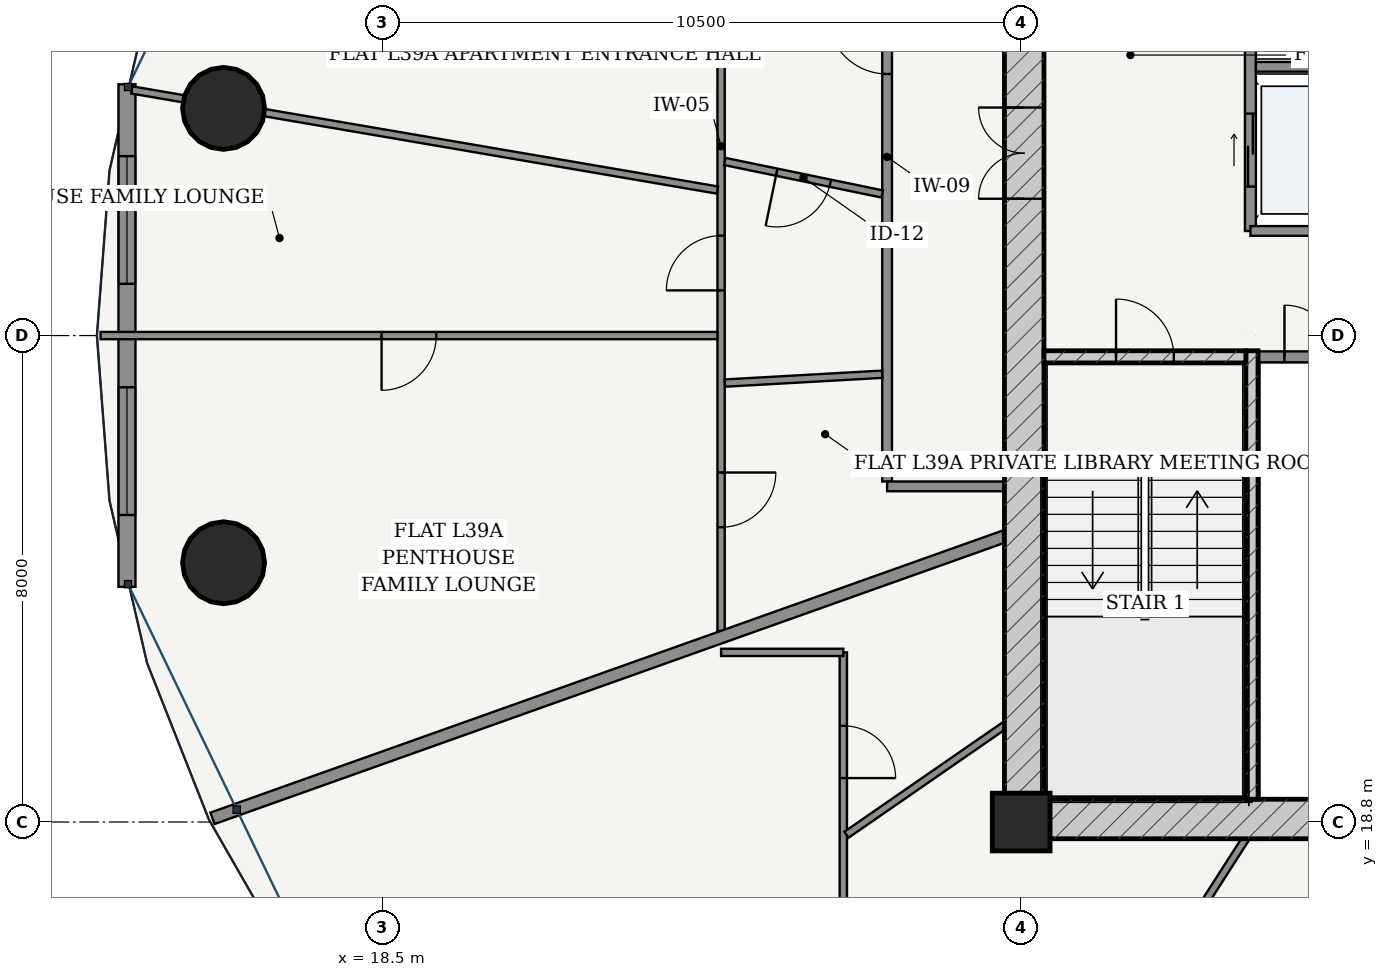
"""IFC4 building model, lengths in metres.
Left out: names, types, materials, properties, quantities, classifications, styles, units other than length and angle.
Written with IfcOpenShell. Run it as: python <this file> out.ifc"""

import sys

from ifc_helpers import new_model, si_unit, direction, frame, frame_2d, origin, origin_2d, place, context, subcontext, project, spatial, rectangle, hollow_circle, extrude, source, transform, mapped, element, fill, save


model = new_model("IFC4")
c1 = context("Model", 3, precision=1e-05, world=origin(), true_north=direction((-0.2419218956, 0.970295726276)))
c2 = subcontext(c1, "Body", "Model", "MODEL_VIEW")
j1 = project(units=[si_unit("LENGTHUNIT", "METRE"), si_unit("PLANEANGLEUNIT", "RADIAN")], contexts=[c1])
p1 = place(None, origin())
s1 = spatial("IfcSite", under=j1, at=p1, CompositionType="ELEMENT")
p2 = place(p1, origin())
s2 = spatial("IfcBuilding", under=s1, at=p2, CompositionType="ELEMENT")
p3 = place(p2, frame((0.0, 0.0, 149.8)))
s3 = spatial("IfcBuildingStorey", under=s2, at=p3, CompositionType="ELEMENT", Elevation=149.8)
p4 = place(p3, frame((29.0, 18.8, 0.0), z_axis=(0.0, 0.0, 1.0), x_axis=(1.0, 0.0, 0.0)))
e1 = element("IfcColumn", 1, at=p4, inside=s3, PredefinedType="COLUMN", context=c2, shape_type="SweptSolid", body=[
    extrude(rectangle(XDim=0.95, YDim=0.95, at=origin_2d()), origin(), (0.0, 0.0, 1.0), 3.6),
])
p5 = place(p3, frame((28.725, 18.85, 0.0), z_axis=(0.0, 0.0, 1.0), x_axis=(1.0, 0.0, 0.0)))
e2 = element("IfcWall", 2, at=p5, inside=s3, PredefinedType="SHEAR", context=c2, shape_type="SweptSolid", body=[
    extrude(rectangle(XDim=18.55, YDim=0.65, at=frame_2d((9.275, 0.0))), origin(), (0.0, 0.0, 1.0), 3.33),
])
p6 = place(p5, frame((7.51, 0.0, 0.0)))
e3 = element("IfcOpeningElement", 3, at=p6, cuts=e2, PredefinedType="OPENING", context=c2, shape_type="SweptSolid", body=[
    extrude(rectangle(XDim=0.85, YDim=2.1, at=frame_2d((0.425, 1.05))), frame((0.0, 0.335, 0.0), z_axis=(0.0, -1.0, 0.0), x_axis=(1.0, 0.0, 0.0)), (0.0, 0.0, 1.0), 0.67),
])
p7 = place(p5, frame((10.59, 0.0, 0.0)))
e4 = element("IfcOpeningElement", 4, at=p7, cuts=e2, PredefinedType="OPENING", context=c2, shape_type="SweptSolid", body=[
    extrude(rectangle(XDim=0.85, YDim=2.1, at=frame_2d((0.425, 1.05))), frame((0.0, 0.335, 0.0), z_axis=(0.0, -1.0, 0.0), x_axis=(1.0, 0.0, 0.0)), (0.0, 0.0, 1.0), 0.67),
])
p8 = place(p3, frame((29.05, 19.175, 0.0), z_axis=(0.0, 0.0, 1.0), x_axis=(0.0, 1.0, 0.0)))
e5 = element("IfcWall", 5, at=p8, inside=s3, PredefinedType="SHEAR", context=c2, shape_type="SweptSolid", body=[
    extrude(rectangle(XDim=15.25, YDim=0.65, at=frame_2d((7.625, 0.0))), origin(), (0.0, 0.0, 1.0), 3.33),
])
p9 = place(p8, frame((9.875, 0.0, 0.0)))
e6 = element("IfcOpeningElement", 6, at=p9, cuts=e5, PredefinedType="OPENING", context=c2, shape_type="SweptSolid", body=[
    extrude(rectangle(XDim=1.5, YDim=2.2, at=frame_2d((0.75, 1.1))), frame((0.0, 0.335, 0.0), z_axis=(0.0, -1.0, 0.0), x_axis=(1.0, 0.0, 0.0)), (0.0, 0.0, 1.0), 0.67),
])
p10 = place(p3, frame((32.795, 19.175, 0.0), z_axis=(0.0, 0.0, 1.0), x_axis=(0.0, 1.0, 0.0)))
e7 = element("IfcWall", 7, at=p10, inside=s3, PredefinedType="SOLIDWALL", context=c2, shape_type="SweptSolid", body=[
    extrude(rectangle(XDim=7.375, YDim=0.2, at=frame_2d((3.688, 0.0))), origin(), (0.0, 0.0, 1.0), 3.33),
])
p11 = place(p3, frame((29.375, 26.45, 0.0), z_axis=(0.0, 0.0, 1.0), x_axis=(1.0, 0.0, 0.0)))
e8 = element("IfcWall", 8, at=p11, inside=s3, PredefinedType="SOLIDWALL", context=c2, shape_type="SweptSolid", body=[
    extrude(rectangle(XDim=3.32, YDim=0.2, at=frame_2d((1.66, 0.0))), origin(), (0.0, 0.0, 1.0), 3.33),
])
p12 = place(p11, frame((1.185, 0.0, 0.0)))
e9 = element("IfcOpeningElement", 9, at=p12, cuts=e8, PredefinedType="OPENING", context=c2, shape_type="SweptSolid", body=[
    extrude(rectangle(XDim=0.95, YDim=2.15, at=frame_2d((0.475, 1.075))), frame((0.0, 0.11, 0.0), z_axis=(0.0, -1.0, 0.0), x_axis=(1.0, 0.0, 0.0)), (0.0, 0.0, 1.0), 0.22),
])
for number, where, z_axis, x_axis in (
    (10, (15.883, 30.536, 0.0), (0.0, 0.0, 1.0), (1.0, 0.0, 0.0)),
    (11, (15.883, 23.064, 0.0), (0.0, 0.0, 1.0), (1.0, 0.0, 0.0)),
):
    element("IfcColumn", number, at=place(p3, frame(where, z_axis=z_axis, x_axis=x_axis)), inside=s3, PredefinedType="COLUMN", context=c2, shape_type="SweptSolid", body=[
        extrude(hollow_circle(Radius=0.675, WallThickness=0.042, at=origin_2d()), origin(), (0.0, 0.0, 1.0), 3.6),
    ])
p13 = place(p3, frame((14.294, 30.932, 0.0), z_axis=(0.0, 0.0, 1.0), x_axis=(0.0, -1.0, 0.0)))
e12 = element("IfcWall", 12, at=p13, inside=s3, PredefinedType="SOLIDWALL", context=c2, shape_type="SweptSolid", body=[
    extrude(rectangle(XDim=8.264, YDim=0.28, at=frame_2d((4.132, 0.0))), origin(), (0.0, 0.0, 1.0), 3.33),
])
p14 = place(p13, frame((1.181, 0.0, 0.85)))
e13 = element("IfcOpeningElement", 13, at=p14, cuts=e12, PredefinedType="OPENING", context=c2, shape_type="SweptSolid", body=[
    extrude(rectangle(XDim=2.1, YDim=1.95, at=frame_2d((1.05, 0.975))), frame((0.0, 0.15, 0.0), z_axis=(0.0, -1.0, 0.0), x_axis=(1.0, 0.0, 0.0)), (0.0, 0.0, 1.0), 0.3),
])
p15 = place(p13, frame((4.983, 0.0, 0.85)))
e14 = element("IfcOpeningElement", 14, at=p15, cuts=e12, PredefinedType="OPENING", context=c2, shape_type="SweptSolid", body=[
    extrude(rectangle(XDim=2.1, YDim=1.95, at=frame_2d((1.05, 0.975))), frame((0.0, 0.15, 0.0), z_axis=(0.0, -1.0, 0.0), x_axis=(1.0, 0.0, 0.0)), (0.0, 0.0, 1.0), 0.3),
])
p16 = place(p3, frame((32.9, 26.45, 0.0), z_axis=(0.0, 0.0, 1.0), x_axis=(1.0, 0.0, 0.0)))
e15 = element("IfcWall", 15, at=p16, inside=s3, PredefinedType="PARTITIONING", context=c2, shape_type="SweptSolid", body=[
    extrude(rectangle(XDim=1.71, YDim=0.18, at=frame_2d((0.855, 0.0))), origin(), (0.0, 0.0, 1.0), 3.33),
])
p17 = place(p16, frame((0.43, 0.0, 0.0)))
e16 = element("IfcOpeningElement", 16, at=p17, cuts=e15, PredefinedType="OPENING", context=c2, shape_type="SweptSolid", body=[
    extrude(rectangle(XDim=0.85, YDim=2.1, at=frame_2d((0.425, 1.05))), frame((0.0, 0.1, 0.0), z_axis=(0.0, -1.0, 0.0), x_axis=(1.0, 0.0, 0.0)), (0.0, 0.0, 1.0), 0.2),
])
p18 = place(p3, frame((32.77, 28.52, 0.0), z_axis=(0.0, 0.0, 1.0), x_axis=(0.0, 1.0, 0.0)))
e17 = element("IfcWall", 17, at=p18, inside=s3, PredefinedType="PARTITIONING", context=c2, shape_type="SweptSolid", body=[
    extrude(rectangle(XDim=5.905, YDim=0.18, at=frame_2d((2.953, 0.0))), origin(), (0.0, 0.0, 1.0), 3.33),
])
p19 = place(p18, frame((3.655, 0.0, 0.0)))
e18 = element("IfcOpeningElement", 18, at=p19, cuts=e17, PredefinedType="OPENING", context=c2, shape_type="SweptSolid", body=[
    extrude(rectangle(XDim=1.15, YDim=2.2, at=frame_2d((0.575, 1.1))), frame((0.0, 0.1, 0.0), z_axis=(0.0, -1.0, 0.0), x_axis=(1.0, 0.0, 0.0)), (0.0, 0.0, 1.0), 0.2),
])
p20 = place(p18, frame((0.73, 0.0, 0.0)))
e19 = element("IfcOpeningElement", 19, at=p20, cuts=e17, PredefinedType="OPENING", context=c2, shape_type="SweptSolid", body=[
    extrude(rectangle(XDim=1.2, YDim=2.25, at=frame_2d((0.6, 1.125))), frame((0.0, 0.1, 0.0), z_axis=(0.0, -1.0, 0.0), x_axis=(1.0, 0.0, 0.0)), (0.0, 0.0, 1.0), 0.2),
])
p21 = place(p3, frame((32.86, 31.22, 0.0), z_axis=(0.0, 0.0, 1.0), x_axis=(1.0, 0.0, 0.0)))
e20 = element("IfcWall", 20, at=p21, inside=s3, PredefinedType="PARTITIONING", context=c2, shape_type="SweptSolid", body=[
    extrude(rectangle(XDim=1.75, YDim=0.16, at=frame_2d((0.875, 0.0))), origin(), (0.0, 0.0, 1.0), 3.33),
])
p22 = place(p3, frame((32.77, 28.52, 0.0), z_axis=(0.0, 0.0, 1.0), x_axis=(1.0, 0.0, 0.0)))
e21 = element("IfcWall", 21, at=p22, inside=s3, PredefinedType="PARTITIONING", context=c2, shape_type="SweptSolid", body=[
    extrude(rectangle(XDim=1.84, YDim=0.16, at=frame_2d((0.92, 0.0))), origin(), (0.0, 0.0, 1.0), 3.33),
])
p23 = place(p3, frame((26.795, 24.4, 0.0), z_axis=(0.0, 0.0, 1.0), x_axis=(0.0, 1.0, 0.0)))
e22 = element("IfcWall", 22, at=p23, inside=s3, PredefinedType="PARTITIONING", context=c2, shape_type="SweptSolid", body=[
    extrude(rectangle(XDim=10.675, YDim=0.16, at=frame_2d((5.337, 0.0))), origin(), (0.0, 0.0, 1.0), 2.776),
])
p24 = place(p23, frame((6.702, 0.0, 0.0)))
e23 = element("IfcOpeningElement", 23, at=p24, cuts=e22, PredefinedType="OPENING", context=c2, shape_type="SweptSolid", body=[
    extrude(rectangle(XDim=0.98, YDim=2.2, at=frame_2d((0.49, 1.1))), frame((0.0, 0.09, 0.0), z_axis=(0.0, -1.0, 0.0), x_axis=(1.0, 0.0, 0.0)), (0.0, 0.0, 1.0), 0.18),
])
p25 = place(p3, frame((26.795, 24.32, 0.0), z_axis=(0.0, 0.0, 1.0), x_axis=(1.0, 0.0, 0.0)))
e24 = element("IfcWall", 24, at=p25, inside=s3, PredefinedType="PARTITIONING", context=c2, shape_type="SweptSolid", body=[
    extrude(rectangle(XDim=1.93, YDim=0.16, at=frame_2d((0.965, 0.0))), origin(), (0.0, 0.0, 1.0), 3.33),
])
p26 = place(p3, frame((24.065, 21.941, 0.0), z_axis=(0.0, 0.0, 1.0), x_axis=(0.0, 1.0, 0.0)))
e25 = element("IfcWall", 25, at=p26, inside=s3, PredefinedType="PARTITIONING", context=c2, shape_type="SweptSolid", body=[
    extrude(rectangle(XDim=15.944, YDim=0.12, at=frame_2d((7.972, 0.0))), origin(), (0.0, 0.0, 1.0), 2.776),
])
p27 = place(p26, frame((5.602, 0.0, 0.0)))
e26 = element("IfcOpeningElement", 26, at=p27, cuts=e25, PredefinedType="OPENING", context=c2, shape_type="SweptSolid", body=[
    extrude(rectangle(XDim=0.9, YDim=2.15, at=frame_2d((0.45, 1.075))), frame((0.0, 0.07, 0.0), z_axis=(0.0, -1.0, 0.0), x_axis=(1.0, 0.0, 0.0)), (0.0, 0.0, 1.0), 0.14),
])
p28 = place(p26, frame((1.707, 0.0, 0.0)))
e27 = element("IfcOpeningElement", 27, at=p28, cuts=e25, PredefinedType="OPENING", context=c2, shape_type="SweptSolid", body=[
    extrude(rectangle(XDim=0.9, YDim=2.15, at=frame_2d((0.45, 1.075))), frame((0.0, 0.07, 0.0), z_axis=(0.0, -1.0, 0.0), x_axis=(1.0, 0.0, 0.0)), (0.0, 0.0, 1.0), 0.14),
])
p29 = place(p26, frame((11.402, 0.0, 0.0)))
e28 = element("IfcOpeningElement", 28, at=p29, cuts=e25, PredefinedType="OPENING", context=c2, shape_type="SweptSolid", body=[
    extrude(rectangle(XDim=0.9, YDim=2.15, at=frame_2d((0.45, 1.075))), frame((0.0, 0.07, 0.0), z_axis=(0.0, -1.0, 0.0), x_axis=(1.0, 0.0, 0.0)), (0.0, 0.0, 1.0), 0.14),
])
p30 = place(p3, frame((24.004, 29.193, 0.0), z_axis=(0.0, 0.0, 1.0), x_axis=(-0.985698378271, 0.168519159369, 0.0)))
e29 = element("IfcWall", 29, at=p30, inside=s3, PredefinedType="PARTITIONING", context=c2, shape_type="SweptSolid", body=[
    extrude(rectangle(XDim=9.769, YDim=0.12, at=frame_2d((4.884, 0.0))), origin(), (0.0, 0.0, 1.0), 2.776),
])
p31 = place(p3, frame((24.003, 26.8, 0.0), z_axis=(0.0, 0.0, 1.0), x_axis=(-1.0, 0.0, 0.0)))
e30 = element("IfcWall", 30, at=p31, inside=s3, PredefinedType="PARTITIONING", context=c2, shape_type="SweptSolid", body=[
    extrude(rectangle(XDim=10.143, YDim=0.12, at=frame_2d((5.071, 0.0))), origin(), (0.0, 0.0, 1.0), 2.846),
])
p32 = place(p31, frame((4.622, 0.0, 0.0)))
e31 = element("IfcOpeningElement", 31, at=p32, cuts=e30, PredefinedType="OPENING", context=c2, shape_type="SweptSolid", body=[
    extrude(rectangle(XDim=0.9, YDim=2.15, at=frame_2d((0.45, 1.075))), frame((0.0, 0.07, 0.0), z_axis=(0.0, -1.0, 0.0), x_axis=(1.0, 0.0, 0.0)), (0.0, 0.0, 1.0), 0.14),
])
p33 = place(p3, frame((26.715, 29.129, 0.0), z_axis=(0.0, 0.0, 1.0), x_axis=(-0.979376501526, 0.202043728582, 0.0)))
e32 = element("IfcWall", 32, at=p33, inside=s3, PredefinedType="PARTITIONING", context=c2, shape_type="SweptSolid", body=[
    extrude(rectangle(XDim=2.644, YDim=0.12, at=frame_2d((1.322, 0.0))), origin(), (0.0, 0.0, 1.0), 3.33),
])
p34 = place(p33, frame((0.872, 0.0, 0.0)))
e33 = element("IfcOpeningElement", 33, at=p34, cuts=e32, PredefinedType="OPENING", context=c2, shape_type="SweptSolid", body=[
    extrude(rectangle(XDim=0.9, YDim=2.15, at=frame_2d((0.45, 1.075))), frame((0.0, 0.07, 0.0), z_axis=(0.0, -1.0, 0.0), x_axis=(1.0, 0.0, 0.0)), (0.0, 0.0, 1.0), 0.14),
])
p35 = place(p3, frame((26.715, 26.164, 0.0), z_axis=(0.0, 0.0, 1.0), x_axis=(-0.998418047295, -0.056226353574, 0.0)))
e34 = element("IfcWall", 34, at=p35, inside=s3, PredefinedType="PARTITIONING", context=c2, shape_type="SweptSolid", body=[
    extrude(rectangle(XDim=2.592, YDim=0.12, at=frame_2d((1.296, 0.0))), origin(), (0.0, 0.0, 1.0), 3.33),
])
p36 = place(p3, frame((28.723, 23.497, 0.0), z_axis=(0.0, 0.0, 1.0), x_axis=(-0.942077095572, -0.335396401292, 0.0)))
e35 = element("IfcWall", 35, at=p36, inside=s3, PredefinedType="PARTITIONING", context=c2, shape_type="SweptSolid", body=[
    extrude(rectangle(XDim=13.823, YDim=0.2, at=frame_2d((6.912, 0.0))), origin(), (0.0, 0.0, 1.0), 2.846),
])
p37 = place(p3, frame((26.075, 15.875, 0.0), z_axis=(0.0, 0.0, 1.0), x_axis=(0.0, 1.0, 0.0)))
e36 = element("IfcWall", 36, at=p37, inside=s3, PredefinedType="PARTITIONING", context=c2, shape_type="SweptSolid", body=[
    extrude(rectangle(XDim=5.715, YDim=0.12, at=frame_2d((2.857, 0.0))), origin(), (0.0, 0.0, 1.0), 2.776),
])
p38 = place(p37, frame((3.648, 0.0, 0.0)))
e37 = element("IfcOpeningElement", 37, at=p38, cuts=e36, PredefinedType="OPENING", context=c2, shape_type="SweptSolid", body=[
    extrude(rectangle(XDim=0.86, YDim=2.15, at=frame_2d((0.43, 1.075))), frame((0.0, 0.07, 0.0), z_axis=(0.0, -1.0, 0.0), x_axis=(1.0, 0.0, 0.0)), (0.0, 0.0, 1.0), 0.14),
])
p39 = place(p3, frame((26.075, 21.59, 0.0), z_axis=(0.0, 0.0, 1.0), x_axis=(-1.0, 0.0, 0.0)))
e38 = element("IfcWall", 38, at=p39, inside=s3, PredefinedType="PARTITIONING", context=c2, shape_type="SweptSolid", body=[
    extrude(rectangle(XDim=2.01, YDim=0.12, at=frame_2d((1.005, 0.0))), origin(), (0.0, 0.0, 1.0), 3.33),
])
p40 = place(p3, frame((28.723, 20.386, 0.0), z_axis=(0.0, 0.0, 1.0), x_axis=(-0.822570551556, -0.568663070467, 0.0)))
e39 = element("IfcWall", 39, at=p40, inside=s3, PredefinedType="PARTITIONING", context=c2, shape_type="SweptSolid", body=[
    extrude(rectangle(XDim=3.158, YDim=0.12, at=frame_2d((1.579, 0.0))), origin(), (0.0, 0.0, 1.0), 3.33),
])
p41 = place(p3, frame((32.691, 18.525, 0.0), z_axis=(0.0, 0.0, 1.0), x_axis=(-0.54002976428, -0.841645919429, 0.0)))
e40 = element("IfcWall", 40, at=p41, inside=s3, PredefinedType="PARTITIONING", context=c2, shape_type="SweptSolid", body=[
    extrude(rectangle(XDim=3.086, YDim=0.12, at=frame_2d((1.543, 0.0))), origin(), (0.0, 0.0, 1.0), 3.33),
])
m1 = source(origin(), c2, "Body", "SweptSolid", [
    extrude(rectangle(XDim=2.1, YDim=1.95, at=frame_2d((1.05, 0.975))), frame((0.0, 0.03, 0.0), z_axis=(0.0, -1.0, 0.0), x_axis=(1.0, 0.0, 0.0)), (0.0, 0.0, 1.0), 0.06),
])
p42 = place(p14, origin())
e41 = element("IfcWindow", 41, at=p42, inside=s3, PartitioningType="SINGLE_PANEL", PredefinedType="WINDOW", context=c2, shape_type="MappedRepresentation", body=[
    mapped(m1, transform((0.0, 0.0, 0.0), scale=1.0)),
])
fill(e13, e41)
p43 = place(p15, origin())
e42 = element("IfcWindow", 42, at=p43, inside=s3, PartitioningType="SINGLE_PANEL", PredefinedType="WINDOW", context=c2, shape_type="MappedRepresentation", body=[
    mapped(m1, transform((0.0, 0.0, 0.0), scale=1.0)),
])
fill(e14, e42)
m2 = source(origin(), c2, "Body", "SweptSolid", [
    extrude(rectangle(XDim=1.5, YDim=2.2, at=frame_2d((0.75, 1.1))), frame((0.0, 0.025, 0.0), z_axis=(0.0, -1.0, 0.0), x_axis=(1.0, 0.0, 0.0)), (0.0, 0.0, 1.0), 0.05),
])
p44 = place(p9, origin())
e43 = element("IfcDoor", 43, at=p44, inside=s3, OperationType="DOUBLE_DOOR_SINGLE_SWING", PredefinedType="DOOR", context=c2, shape_type="MappedRepresentation", body=[
    mapped(m2, transform((0.0, 0.0, 0.0), scale=1.0)),
])
fill(e6, e43)
m3 = source(origin(), c2, "Body", "SweptSolid", [
    extrude(rectangle(XDim=0.95, YDim=2.15, at=frame_2d((0.475, 1.075))), frame((0.0, 0.025, 0.0), z_axis=(0.0, -1.0, 0.0), x_axis=(1.0, 0.0, 0.0)), (0.0, 0.0, 1.0), 0.05),
])
p45 = place(p12, origin())
e44 = element("IfcDoor", 44, at=p45, inside=s3, OperationType="SINGLE_SWING_LEFT", PredefinedType="DOOR", context=c2, shape_type="MappedRepresentation", body=[
    mapped(m3, transform((0.0, 0.0, 0.0), scale=1.0)),
])
fill(e9, e44)
m4 = source(origin(), c2, "Body", "SweptSolid", [
    extrude(rectangle(XDim=0.85, YDim=2.1, at=frame_2d((0.425, 1.05))), frame((0.0, 0.025, 0.0), z_axis=(0.0, -1.0, 0.0), x_axis=(1.0, 0.0, 0.0)), (0.0, 0.0, 1.0), 0.05),
])
p46 = place(p17, origin())
e45 = element("IfcDoor", 45, at=p46, inside=s3, OperationType="SINGLE_SWING_LEFT", PredefinedType="DOOR", context=c2, shape_type="MappedRepresentation", body=[
    mapped(m4, transform((0.0, 0.0, 0.0), scale=1.0)),
])
fill(e16, e45)
m5 = source(origin(), c2, "Body", "SweptSolid", [
    extrude(rectangle(XDim=1.2, YDim=2.25, at=frame_2d((0.6, 1.125))), frame((0.0, 0.025, 0.0), z_axis=(0.0, -1.0, 0.0), x_axis=(1.0, 0.0, 0.0)), (0.0, 0.0, 1.0), 0.05),
])
p47 = place(p20, origin())
e46 = element("IfcDoor", 46, at=p47, inside=s3, OperationType="DOUBLE_DOOR_SLIDING", PredefinedType="DOOR", context=c2, shape_type="MappedRepresentation", body=[
    mapped(m5, transform((0.0, 0.0, 0.0), scale=1.0)),
])
fill(e19, e46)
m6 = source(origin(), c2, "Body", "SweptSolid", [
    extrude(rectangle(XDim=0.98, YDim=2.2, at=frame_2d((0.49, 1.1))), frame((0.0, 0.025, 0.0), z_axis=(0.0, -1.0, 0.0), x_axis=(1.0, 0.0, 0.0)), (0.0, 0.0, 1.0), 0.05),
])
p48 = place(p24, origin())
e47 = element("IfcDoor", 47, at=p48, inside=s3, OperationType="SINGLE_SWING_RIGHT", PredefinedType="DOOR", context=c2, shape_type="MappedRepresentation", body=[
    mapped(m6, transform((0.0, 0.0, 0.0), scale=1.0)),
])
fill(e23, e47)
m7 = source(origin(), c2, "Body", "SweptSolid", [
    extrude(rectangle(XDim=0.9, YDim=2.15, at=frame_2d((0.45, 1.075))), frame((0.0, 0.025, 0.0), z_axis=(0.0, -1.0, 0.0), x_axis=(1.0, 0.0, 0.0)), (0.0, 0.0, 1.0), 0.05),
])
p49 = place(p34, origin())
e48 = element("IfcDoor", 48, at=p49, inside=s3, OperationType="SINGLE_SWING_RIGHT", PredefinedType="DOOR", context=c2, shape_type="MappedRepresentation", body=[
    mapped(m7, transform((0.0, 0.0, 0.0), scale=1.0)),
])
fill(e33, e48)
p50 = place(p27, origin())
e49 = element("IfcDoor", 49, at=p50, inside=s3, OperationType="SINGLE_SWING_LEFT", PredefinedType="DOOR", context=c2, shape_type="MappedRepresentation", body=[
    mapped(m7, transform((0.0, 0.0, 0.0), scale=1.0)),
])
fill(e26, e49)
p51 = place(p32, origin())
e50 = element("IfcDoor", 50, at=p51, inside=s3, OperationType="SINGLE_SWING_RIGHT", PredefinedType="DOOR", context=c2, shape_type="MappedRepresentation", body=[
    mapped(m7, transform((0.0, 0.0, 0.0), scale=1.0)),
])
fill(e31, e50)
p52 = place(p28, frame((0.9, 0.0, 0.0), z_axis=(0.0, 0.0, 1.0), x_axis=(-1.0, 0.0, 0.0)))
e51 = element("IfcDoor", 51, at=p52, inside=s3, OperationType="SINGLE_SWING_LEFT", PredefinedType="DOOR", context=c2, shape_type="MappedRepresentation", body=[
    mapped(m7, transform((0.0, 0.0, 0.0), scale=1.0)),
])
fill(e27, e51)
m8 = source(origin(), c2, "Body", "SweptSolid", [
    extrude(rectangle(XDim=0.86, YDim=2.15, at=frame_2d((0.43, 1.075))), frame((0.0, 0.025, 0.0), z_axis=(0.0, -1.0, 0.0), x_axis=(1.0, 0.0, 0.0)), (0.0, 0.0, 1.0), 0.05),
])
p53 = place(p38, frame((0.86, 0.0, 0.0), z_axis=(0.0, 0.0, 1.0), x_axis=(-1.0, 0.0, 0.0)))
e52 = element("IfcDoor", 52, at=p53, inside=s3, OperationType="SINGLE_SWING_RIGHT", PredefinedType="DOOR", context=c2, shape_type="MappedRepresentation", body=[
    mapped(m8, transform((0.0, 0.0, 0.0), scale=1.0)),
])
fill(e37, e52)
save(model, sys.argv[1])
